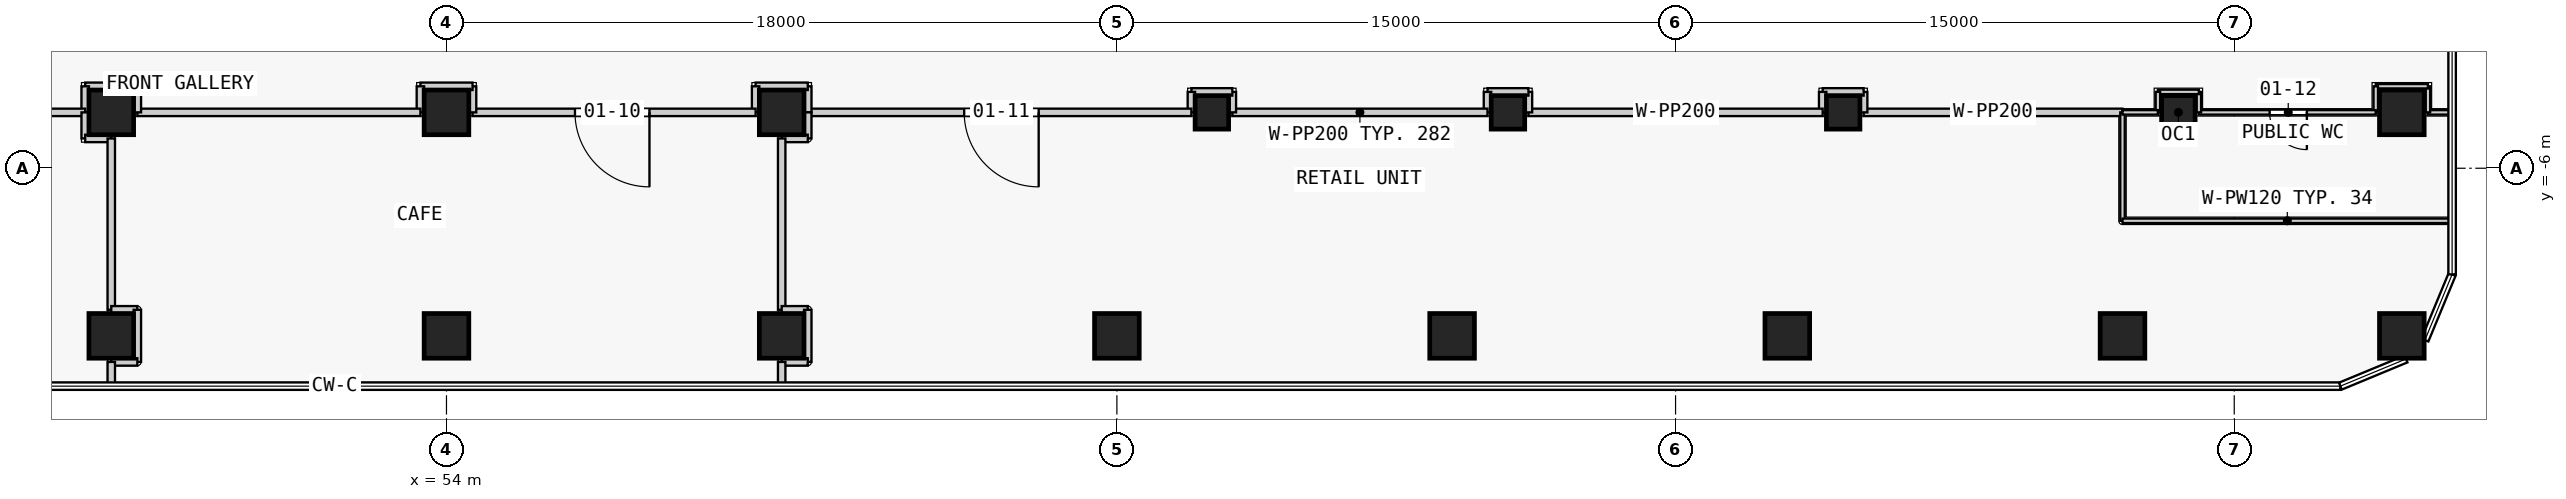
"""IFC4 building model, lengths in metres.
Left out: names, types, materials, properties, quantities, classifications, styles, units other than length and angle.
Written with IfcOpenShell. Run it as: python <this file> out.ifc"""

import sys

from ifc_helpers import new_model, si_unit, direction, frame, frame_2d, origin, origin_2d, place, context, subcontext, project, spatial, rectangle, extrude, element, fill, save


model = new_model("IFC4")
c1 = context("Model", 3, precision=1e-05, world=origin(), true_north=direction((0.0, 1.0)))
c2 = subcontext(c1, "Body", "Model", "MODEL_VIEW")
j1 = project(units=[si_unit("LENGTHUNIT", "METRE"), si_unit("PLANEANGLEUNIT", "RADIAN")], contexts=[c1])
p1 = place(None, origin())
s1 = spatial("IfcSite", under=j1, at=p1, CompositionType="ELEMENT")
p2 = place(p1, origin())
s2 = spatial("IfcBuilding", under=s1, at=p2, CompositionType="ELEMENT")
p3 = place(p2, frame((0.0, 0.0, 8.0)))
s3 = spatial("IfcBuildingStorey", under=s2, at=p3, CompositionType="ELEMENT", Elevation=8.0)
for number, where, z_axis, x_axis in (
    (1, (45.0, -10.5, 0.0), (0.0, 0.0, 1.0), (1.0, 0.0, 0.0)),
    (2, (45.0, -4.5, 0.0), (0.0, 0.0, 1.0), (1.0, 0.0, 0.0)),
    (3, (54.0, -10.5, 0.0), (0.0, 0.0, 1.0), (1.0, 0.0, 0.0)),
    (4, (54.0, -4.5, 0.0), (0.0, 0.0, 1.0), (1.0, 0.0, 0.0)),
    (5, (63.0, -10.5, 0.0), (0.0, 0.0, 1.0), (1.0, 0.0, 0.0)),
    (6, (63.0, -4.5, 0.0), (0.0, 0.0, 1.0), (1.0, 0.0, 0.0)),
    (7, (72.0, -10.5, 0.0), (0.0, 0.0, 1.0), (1.0, 0.0, 0.0)),
    (8, (81.0, -10.5, 0.0), (0.0, 0.0, 1.0), (1.0, 0.0, 0.0)),
    (9, (90.0, -10.5, 0.0), (0.0, 0.0, 1.0), (1.0, 0.0, 0.0)),
    (10, (99.0, -10.5, 0.0), (0.0, 0.0, 1.0), (1.0, 0.0, 0.0)),
    (11, (106.5, -10.5, 0.0), (0.0, 0.0, 1.0), (1.0, 0.0, 0.0)),
    (12, (106.5, -4.5, 0.0), (0.0, 0.0, 1.0), (1.0, 0.0, 0.0)),
):
    element("IfcColumn", number, at=place(p3, frame(where, z_axis=z_axis, x_axis=x_axis)), inside=s3, PredefinedType="COLUMN", context=c2, shape_type="SweptSolid", body=[
        extrude(rectangle(XDim=1.2, YDim=1.2, at=origin_2d()), origin(), (0.0, 0.0, 1.0), 4.8),
    ])
for number, where, z_axis, x_axis in (
    (13, (74.55, -4.5, 0.0), (0.0, 0.0, 1.0), (1.0, 0.0, 0.0)),
    (14, (82.5, -4.5, 0.0), (0.0, 0.0, 1.0), (1.0, 0.0, 0.0)),
    (15, (91.5, -4.5, 0.0), (0.0, 0.0, 1.0), (1.0, 0.0, 0.0)),
    (16, (100.5, -4.5, 0.0), (0.0, 0.0, 1.0), (1.0, 0.0, 0.0)),
):
    element("IfcColumn", number, at=place(p3, frame(where, z_axis=z_axis, x_axis=x_axis)), inside=s3, PredefinedType="COLUMN", context=c2, shape_type="SweptSolid", body=[
        extrude(rectangle(XDim=0.9, YDim=0.9, at=origin_2d()), origin(), (0.0, 0.0, 1.0), 4.8),
    ])
p4 = place(p3, frame((99.0, -4.5, 0.0), z_axis=(0.0, 0.0, 1.0), x_axis=(-1.0, 0.0, 0.0)))
e17 = element("IfcWall", 17, at=p4, inside=s3, PredefinedType="PARTITIONING", context=c2, shape_type="SweptSolid", body=[
    extrude(rectangle(XDim=6.95, YDim=0.2, at=frame_2d((3.475, 0.0))), origin(), (0.0, 0.0, 1.0), 4.45),
])
p5 = place(p3, frame((92.05, -4.5, 0.0), z_axis=(0.0, 0.0, 1.0), x_axis=(0.0, 1.0, 0.0)))
e18 = element("IfcWall", 18, at=p5, inside=s3, PredefinedType="PARTITIONING", context=c2, shape_type="SweptSolid", body=[
    extrude(rectangle(XDim=0.55, YDim=0.2, at=frame_2d((0.275, 0.0))), origin(), (0.0, 0.0, 1.0), 4.45),
])
p6 = place(p3, frame((92.05, -3.95, 0.0), z_axis=(0.0, 0.0, 1.0), x_axis=(-1.0, 0.0, 0.0)))
e19 = element("IfcWall", 19, at=p6, inside=s3, PredefinedType="PARTITIONING", context=c2, shape_type="SweptSolid", body=[
    extrude(rectangle(XDim=1.1, YDim=0.2, at=frame_2d((0.55, 0.0))), origin(), (0.0, 0.0, 1.0), 4.45),
])
p7 = place(p3, frame((90.95, -3.95, 0.0), z_axis=(0.0, 0.0, 1.0), x_axis=(0.0, -1.0, 0.0)))
e20 = element("IfcWall", 20, at=p7, inside=s3, PredefinedType="PARTITIONING", context=c2, shape_type="SweptSolid", body=[
    extrude(rectangle(XDim=0.55, YDim=0.2, at=frame_2d((0.275, 0.0))), origin(), (0.0, 0.0, 1.0), 4.45),
])
p8 = place(p3, frame((90.95, -4.5, 0.0), z_axis=(0.0, 0.0, 1.0), x_axis=(-1.0, 0.0, 0.0)))
e21 = element("IfcWall", 21, at=p8, inside=s3, PredefinedType="PARTITIONING", context=c2, shape_type="SweptSolid", body=[
    extrude(rectangle(XDim=7.9, YDim=0.2, at=frame_2d((3.95, 0.0))), origin(), (0.0, 0.0, 1.0), 4.45),
])
p9 = place(p3, frame((83.05, -4.5, 0.0), z_axis=(0.0, 0.0, 1.0), x_axis=(0.0, 1.0, 0.0)))
e22 = element("IfcWall", 22, at=p9, inside=s3, PredefinedType="PARTITIONING", context=c2, shape_type="SweptSolid", body=[
    extrude(rectangle(XDim=0.55, YDim=0.2, at=frame_2d((0.275, 0.0))), origin(), (0.0, 0.0, 1.0), 4.45),
])
p10 = place(p3, frame((83.05, -3.95, 0.0), z_axis=(0.0, 0.0, 1.0), x_axis=(-1.0, 0.0, 0.0)))
e23 = element("IfcWall", 23, at=p10, inside=s3, PredefinedType="PARTITIONING", context=c2, shape_type="SweptSolid", body=[
    extrude(rectangle(XDim=1.1, YDim=0.2, at=frame_2d((0.55, 0.0))), origin(), (0.0, 0.0, 1.0), 4.45),
])
p11 = place(p3, frame((81.95, -3.95, 0.0), z_axis=(0.0, 0.0, 1.0), x_axis=(0.0, -1.0, 0.0)))
e24 = element("IfcWall", 24, at=p11, inside=s3, PredefinedType="PARTITIONING", context=c2, shape_type="SweptSolid", body=[
    extrude(rectangle(XDim=0.55, YDim=0.2, at=frame_2d((0.275, 0.0))), origin(), (0.0, 0.0, 1.0), 4.45),
])
p12 = place(p3, frame((81.95, -4.5, 0.0), z_axis=(0.0, 0.0, 1.0), x_axis=(-1.0, 0.0, 0.0)))
e25 = element("IfcWall", 25, at=p12, inside=s3, PredefinedType="PARTITIONING", context=c2, shape_type="SweptSolid", body=[
    extrude(rectangle(XDim=6.85, YDim=0.2, at=frame_2d((3.425, 0.0))), origin(), (0.0, 0.0, 1.0), 4.45),
])
p13 = place(p3, frame((75.1, -4.5, 0.0), z_axis=(0.0, 0.0, 1.0), x_axis=(0.0, 1.0, 0.0)))
e26 = element("IfcWall", 26, at=p13, inside=s3, PredefinedType="PARTITIONING", context=c2, shape_type="SweptSolid", body=[
    extrude(rectangle(XDim=0.55, YDim=0.2, at=frame_2d((0.275, 0.0))), origin(), (0.0, 0.0, 1.0), 4.45),
])
p14 = place(p3, frame((75.1, -3.95, 0.0), z_axis=(0.0, 0.0, 1.0), x_axis=(-1.0, 0.0, 0.0)))
e27 = element("IfcWall", 27, at=p14, inside=s3, PredefinedType="PARTITIONING", context=c2, shape_type="SweptSolid", body=[
    extrude(rectangle(XDim=1.1, YDim=0.2, at=frame_2d((0.55, 0.0))), origin(), (0.0, 0.0, 1.0), 4.45),
])
p15 = place(p3, frame((74.0, -3.95, 0.0), z_axis=(0.0, 0.0, 1.0), x_axis=(0.0, -1.0, 0.0)))
e28 = element("IfcWall", 28, at=p15, inside=s3, PredefinedType="PARTITIONING", context=c2, shape_type="SweptSolid", body=[
    extrude(rectangle(XDim=0.55, YDim=0.2, at=frame_2d((0.275, 0.0))), origin(), (0.0, 0.0, 1.0), 4.45),
])
p16 = place(p3, frame((74.0, -4.5, 0.0), z_axis=(0.0, 0.0, 1.0), x_axis=(-1.0, 0.0, 0.0)))
e29 = element("IfcWall", 29, at=p16, inside=s3, PredefinedType="PARTITIONING", context=c2, shape_type="SweptSolid", body=[
    extrude(rectangle(XDim=10.3, YDim=0.2, at=frame_2d((5.15, 0.0))), origin(), (0.0, 0.0, 1.0), 4.45),
])
p17 = place(p16, frame((4.1, 0.0, 0.0)))
e30 = element("IfcOpeningElement", 30, at=p17, cuts=e29, PredefinedType="OPENING", context=c2, shape_type="SweptSolid", body=[
    extrude(rectangle(XDim=2.0, YDim=2.4, at=frame_2d((1.0, 1.2))), frame((0.0, 0.11, 0.0), z_axis=(0.0, -1.0, 0.0), x_axis=(1.0, 0.0, 0.0)), (0.0, 0.0, 1.0), 0.22),
])
p18 = place(p3, frame((63.7, -4.5, 0.0), z_axis=(0.0, 0.0, 1.0), x_axis=(0.0, 1.0, 0.0)))
e31 = element("IfcWall", 31, at=p18, inside=s3, PredefinedType="PARTITIONING", context=c2, shape_type="SweptSolid", body=[
    extrude(rectangle(XDim=0.7, YDim=0.2, at=frame_2d((0.35, 0.0))), origin(), (0.0, 0.0, 1.0), 4.45),
])
p19 = place(p3, frame((63.7, -3.8, 0.0), z_axis=(0.0, 0.0, 1.0), x_axis=(-1.0, 0.0, 0.0)))
e32 = element("IfcWall", 32, at=p19, inside=s3, PredefinedType="PARTITIONING", context=c2, shape_type="SweptSolid", body=[
    extrude(rectangle(XDim=1.4, YDim=0.2, at=frame_2d((0.7, 0.0))), origin(), (0.0, 0.0, 1.0), 3.75),
])
p20 = place(p3, frame((62.3, -3.8, 0.0), z_axis=(0.0, 0.0, 1.0), x_axis=(0.0, -1.0, 0.0)))
e33 = element("IfcWall", 33, at=p20, inside=s3, PredefinedType="PARTITIONING", context=c2, shape_type="SweptSolid", body=[
    extrude(rectangle(XDim=0.7, YDim=0.2, at=frame_2d((0.35, 0.0))), origin(), (0.0, 0.0, 1.0), 3.75),
])
p21 = place(p3, frame((62.3, -4.5, 0.0), z_axis=(0.0, 0.0, 1.0), x_axis=(-1.0, 0.0, 0.0)))
e34 = element("IfcWall", 34, at=p21, inside=s3, PredefinedType="PARTITIONING", context=c2, shape_type="SweptSolid", body=[
    extrude(rectangle(XDim=7.6, YDim=0.2, at=frame_2d((3.8, 0.0))), origin(), (0.0, 0.0, 1.0), 3.75),
])
p22 = place(p21, frame((2.85, 0.0, 0.0)))
e35 = element("IfcOpeningElement", 35, at=p22, cuts=e34, PredefinedType="OPENING", context=c2, shape_type="SweptSolid", body=[
    extrude(rectangle(XDim=2.0, YDim=2.4, at=frame_2d((1.0, 1.2))), frame((0.0, 0.11, 0.0), z_axis=(0.0, -1.0, 0.0), x_axis=(1.0, 0.0, 0.0)), (0.0, 0.0, 1.0), 0.22),
])
p23 = place(p3, frame((54.7, -4.5, 0.0), z_axis=(0.0, 0.0, 1.0), x_axis=(0.0, 1.0, 0.0)))
e36 = element("IfcWall", 36, at=p23, inside=s3, PredefinedType="PARTITIONING", context=c2, shape_type="SweptSolid", body=[
    extrude(rectangle(XDim=0.7, YDim=0.2, at=frame_2d((0.35, 0.0))), origin(), (0.0, 0.0, 1.0), 3.75),
])
p24 = place(p3, frame((54.7, -3.8, 0.0), z_axis=(0.0, 0.0, 1.0), x_axis=(-1.0, 0.0, 0.0)))
e37 = element("IfcWall", 37, at=p24, inside=s3, PredefinedType="PARTITIONING", context=c2, shape_type="SweptSolid", body=[
    extrude(rectangle(XDim=1.4, YDim=0.2, at=frame_2d((0.7, 0.0))), origin(), (0.0, 0.0, 1.0), 3.75),
])
p25 = place(p3, frame((53.3, -3.8, 0.0), z_axis=(0.0, 0.0, 1.0), x_axis=(0.0, -1.0, 0.0)))
e38 = element("IfcWall", 38, at=p25, inside=s3, PredefinedType="PARTITIONING", context=c2, shape_type="SweptSolid", body=[
    extrude(rectangle(XDim=0.7, YDim=0.2, at=frame_2d((0.35, 0.0))), origin(), (0.0, 0.0, 1.0), 3.75),
])
p26 = place(p3, frame((53.3, -4.5, 0.0), z_axis=(0.0, 0.0, 1.0), x_axis=(-1.0, 0.0, 0.0)))
e39 = element("IfcWall", 39, at=p26, inside=s3, PredefinedType="PARTITIONING", context=c2, shape_type="SweptSolid", body=[
    extrude(rectangle(XDim=7.6, YDim=0.2, at=frame_2d((3.8, 0.0))), origin(), (0.0, 0.0, 1.0), 3.75),
])
p27 = place(p3, frame((45.7, -4.5, 0.0), z_axis=(0.0, 0.0, 1.0), x_axis=(0.0, 1.0, 0.0)))
e40 = element("IfcWall", 40, at=p27, inside=s3, PredefinedType="PARTITIONING", context=c2, shape_type="SweptSolid", body=[
    extrude(rectangle(XDim=0.7, YDim=0.2, at=frame_2d((0.35, 0.0))), origin(), (0.0, 0.0, 1.0), 3.75),
])
p28 = place(p3, frame((45.7, -3.8, 0.0), z_axis=(0.0, 0.0, 1.0), x_axis=(-1.0, 0.0, 0.0)))
e41 = element("IfcWall", 41, at=p28, inside=s3, PredefinedType="PARTITIONING", context=c2, shape_type="SweptSolid", body=[
    extrude(rectangle(XDim=1.4, YDim=0.2, at=frame_2d((0.7, 0.0))), origin(), (0.0, 0.0, 1.0), 3.75),
])
p29 = place(p3, frame((44.3, -3.8, 0.0), z_axis=(0.0, 0.0, 1.0), x_axis=(0.0, -1.0, 0.0)))
e42 = element("IfcWall", 42, at=p29, inside=s3, PredefinedType="PARTITIONING", context=c2, shape_type="SweptSolid", body=[
    extrude(rectangle(XDim=0.7, YDim=0.2, at=frame_2d((0.35, 0.0))), origin(), (0.0, 0.0, 1.0), 3.75),
])
p30 = place(p3, frame((44.3, -4.5, 0.0), z_axis=(0.0, 0.0, 1.0), x_axis=(-1.0, 0.0, 0.0)))
e43 = element("IfcWall", 43, at=p30, inside=s3, PredefinedType="PARTITIONING", context=c2, shape_type="SweptSolid", body=[
    extrude(rectangle(XDim=7.6, YDim=0.2, at=frame_2d((3.8, 0.0))), origin(), (0.0, 0.0, 1.0), 3.75),
])
p31 = place(p3, frame((99.0, -4.5, 0.0), z_axis=(0.0, 0.0, 1.0), x_axis=(0.0, -1.0, 0.0)))
e44 = element("IfcWall", 44, at=p31, inside=s3, PredefinedType="PARTITIONING", context=c2, shape_type="SweptSolid", body=[
    extrude(rectangle(XDim=2.911, YDim=0.12, at=frame_2d((1.456, 0.0))), origin(), (0.0, 0.0, 1.0), 4.45),
])
p32 = place(p3, frame((99.0, -7.411, 0.0), z_axis=(0.0, 0.0, 1.0), x_axis=(1.0, 0.0, 0.0)))
e45 = element("IfcWall", 45, at=p32, inside=s3, PredefinedType="PARTITIONING", context=c2, shape_type="SweptSolid", body=[
    extrude(rectangle(XDim=8.85, YDim=0.12, at=frame_2d((4.425, 0.0))), origin(), (0.0, 0.0, 1.0), 3.75),
])
p33 = place(p3, frame((107.85, -4.5, 0.0), z_axis=(0.0, 0.0, 1.0), x_axis=(-1.0, 0.0, 0.0)))
e46 = element("IfcWall", 46, at=p33, inside=s3, PredefinedType="PARTITIONING", context=c2, shape_type="SweptSolid", body=[
    extrude(rectangle(XDim=0.65, YDim=0.12, at=frame_2d((0.325, 0.0))), origin(), (0.0, 0.0, 1.0), 4.45),
])
p34 = place(p3, frame((107.2, -4.5, 0.0), z_axis=(0.0, 0.0, 1.0), x_axis=(0.0, 1.0, 0.0)))
e47 = element("IfcWall", 47, at=p34, inside=s3, PredefinedType="PARTITIONING", context=c2, shape_type="SweptSolid", body=[
    extrude(rectangle(XDim=0.7, YDim=0.12, at=frame_2d((0.35, 0.0))), origin(), (0.0, 0.0, 1.0), 4.45),
])
p35 = place(p3, frame((107.2, -3.8, 0.0), z_axis=(0.0, 0.0, 1.0), x_axis=(-1.0, 0.0, 0.0)))
e48 = element("IfcWall", 48, at=p35, inside=s3, PredefinedType="PARTITIONING", context=c2, shape_type="SweptSolid", body=[
    extrude(rectangle(XDim=1.4, YDim=0.12, at=frame_2d((0.7, 0.0))), origin(), (0.0, 0.0, 1.0), 3.75),
])
p36 = place(p3, frame((105.8, -3.8, 0.0), z_axis=(0.0, 0.0, 1.0), x_axis=(0.0, -1.0, 0.0)))
e49 = element("IfcWall", 49, at=p36, inside=s3, PredefinedType="PARTITIONING", context=c2, shape_type="SweptSolid", body=[
    extrude(rectangle(XDim=0.7, YDim=0.12, at=frame_2d((0.35, 0.0))), origin(), (0.0, 0.0, 1.0), 4.45),
])
p37 = place(p3, frame((105.8, -4.5, 0.0), z_axis=(0.0, 0.0, 1.0), x_axis=(-1.0, 0.0, 0.0)))
e50 = element("IfcWall", 50, at=p37, inside=s3, PredefinedType="PARTITIONING", context=c2, shape_type="SweptSolid", body=[
    extrude(rectangle(XDim=4.75, YDim=0.12, at=frame_2d((2.375, 0.0))), origin(), (0.0, 0.0, 1.0), 4.45),
])
p38 = place(p37, frame((1.85, 0.0, 0.0)))
e51 = element("IfcOpeningElement", 51, at=p38, cuts=e50, PredefinedType="OPENING", context=c2, shape_type="SweptSolid", body=[
    extrude(rectangle(XDim=1.0, YDim=2.1, at=frame_2d((0.5, 1.05))), frame((0.0, 0.07, 0.0), z_axis=(0.0, -1.0, 0.0), x_axis=(1.0, 0.0, 0.0)), (0.0, 0.0, 1.0), 0.14),
])
p39 = place(p3, frame((101.05, -4.5, 0.0), z_axis=(0.0, 0.0, 1.0), x_axis=(0.0, 1.0, 0.0)))
e52 = element("IfcWall", 52, at=p39, inside=s3, PredefinedType="PARTITIONING", context=c2, shape_type="SweptSolid", body=[
    extrude(rectangle(XDim=0.55, YDim=0.12, at=frame_2d((0.275, 0.0))), origin(), (0.0, 0.0, 1.0), 4.45),
])
p40 = place(p3, frame((101.05, -3.95, 0.0), z_axis=(0.0, 0.0, 1.0), x_axis=(-1.0, 0.0, 0.0)))
e53 = element("IfcWall", 53, at=p40, inside=s3, PredefinedType="PARTITIONING", context=c2, shape_type="SweptSolid", body=[
    extrude(rectangle(XDim=1.1, YDim=0.12, at=frame_2d((0.55, 0.0))), origin(), (0.0, 0.0, 1.0), 4.45),
])
p41 = place(p3, frame((99.95, -3.95, 0.0), z_axis=(0.0, 0.0, 1.0), x_axis=(0.0, -1.0, 0.0)))
e54 = element("IfcWall", 54, at=p41, inside=s3, PredefinedType="PARTITIONING", context=c2, shape_type="SweptSolid", body=[
    extrude(rectangle(XDim=0.55, YDim=0.12, at=frame_2d((0.275, 0.0))), origin(), (0.0, 0.0, 1.0), 4.45),
])
p42 = place(p3, frame((99.95, -4.5, 0.0), z_axis=(0.0, 0.0, 1.0), x_axis=(-1.0, 0.0, 0.0)))
e55 = element("IfcWall", 55, at=p42, inside=s3, PredefinedType="PARTITIONING", context=c2, shape_type="SweptSolid", body=[
    extrude(rectangle(XDim=0.95, YDim=0.12, at=frame_2d((0.475, 0.0))), origin(), (0.0, 0.0, 1.0), 4.45),
])
for number, where, z_axis, x_axis in (
    (56, (44.3, -4.5, 0.0), (0.0, 0.0, 1.0), (0.0, -1.0, 0.0)),
    (57, (44.3, -5.2, 0.0), (0.0, 0.0, 1.0), (1.0, 0.0, 0.0)),
):
    element("IfcWall", number, at=place(p3, frame(where, z_axis=z_axis, x_axis=x_axis)), inside=s3, PredefinedType="PARTITIONING", context=c2, shape_type="SweptSolid", body=[
        extrude(rectangle(XDim=0.7, YDim=0.2, at=frame_2d((0.35, 0.0))), origin(), (0.0, 0.0, 1.0), 3.75),
    ])
p43 = place(p3, frame((45.0, -5.2, 0.0), z_axis=(0.0, 0.0, 1.0), x_axis=(0.0, -1.0, 0.0)))
e58 = element("IfcWall", 58, at=p43, inside=s3, PredefinedType="PARTITIONING", context=c2, shape_type="SweptSolid", body=[
    extrude(rectangle(XDim=4.6, YDim=0.2, at=frame_2d((2.3, 0.0))), origin(), (0.0, 0.0, 1.0), 3.75),
])
p44 = place(p3, frame((45.0, -9.8, 0.0), z_axis=(0.0, 0.0, 1.0), x_axis=(1.0, 0.0, 0.0)))
e59 = element("IfcWall", 59, at=p44, inside=s3, PredefinedType="PARTITIONING", context=c2, shape_type="SweptSolid", body=[
    extrude(rectangle(XDim=0.7, YDim=0.2, at=frame_2d((0.35, 0.0))), origin(), (0.0, 0.0, 1.0), 3.75),
])
p45 = place(p3, frame((45.7, -9.8, 0.0), z_axis=(0.0, 0.0, 1.0), x_axis=(0.0, -1.0, 0.0)))
e60 = element("IfcWall", 60, at=p45, inside=s3, PredefinedType="PARTITIONING", context=c2, shape_type="SweptSolid", body=[
    extrude(rectangle(XDim=1.4, YDim=0.2, at=frame_2d((0.7, 0.0))), origin(), (0.0, 0.0, 1.0), 3.75),
])
p46 = place(p3, frame((45.7, -11.2, 0.0), z_axis=(0.0, 0.0, 1.0), x_axis=(-1.0, 0.0, 0.0)))
e61 = element("IfcWall", 61, at=p46, inside=s3, PredefinedType="PARTITIONING", context=c2, shape_type="SweptSolid", body=[
    extrude(rectangle(XDim=0.7, YDim=0.2, at=frame_2d((0.35, 0.0))), origin(), (0.0, 0.0, 1.0), 4.45),
])
p47 = place(p3, frame((45.0, -11.2, 0.0), z_axis=(0.0, 0.0, 1.0), x_axis=(0.0, -1.0, 0.0)))
e62 = element("IfcWall", 62, at=p47, inside=s3, PredefinedType="PARTITIONING", context=c2, shape_type="SweptSolid", body=[
    extrude(rectangle(XDim=0.65, YDim=0.2, at=frame_2d((0.325, 0.0))), origin(), (0.0, 0.0, 1.0), 4.45),
])
p48 = place(p3, frame((63.7, -4.5, 0.0), z_axis=(0.0, 0.0, 1.0), x_axis=(0.0, -1.0, 0.0)))
e63 = element("IfcWall", 63, at=p48, inside=s3, PredefinedType="PARTITIONING", context=c2, shape_type="SweptSolid", body=[
    extrude(rectangle(XDim=0.7, YDim=0.2, at=frame_2d((0.35, 0.0))), origin(), (0.0, 0.0, 1.0), 4.45),
])
p49 = place(p3, frame((63.7, -5.2, 0.0), z_axis=(0.0, 0.0, 1.0), x_axis=(-1.0, 0.0, 0.0)))
e64 = element("IfcWall", 64, at=p49, inside=s3, PredefinedType="PARTITIONING", context=c2, shape_type="SweptSolid", body=[
    extrude(rectangle(XDim=0.7, YDim=0.2, at=frame_2d((0.35, 0.0))), origin(), (0.0, 0.0, 1.0), 3.75),
])
p50 = place(p3, frame((63.0, -5.2, 0.0), z_axis=(0.0, 0.0, 1.0), x_axis=(0.0, -1.0, 0.0)))
e65 = element("IfcWall", 65, at=p50, inside=s3, PredefinedType="PARTITIONING", context=c2, shape_type="SweptSolid", body=[
    extrude(rectangle(XDim=4.6, YDim=0.2, at=frame_2d((2.3, 0.0))), origin(), (0.0, 0.0, 1.0), 3.75),
])
p51 = place(p3, frame((63.0, -9.8, 0.0), z_axis=(0.0, 0.0, 1.0), x_axis=(1.0, 0.0, 0.0)))
e66 = element("IfcWall", 66, at=p51, inside=s3, PredefinedType="PARTITIONING", context=c2, shape_type="SweptSolid", body=[
    extrude(rectangle(XDim=0.7, YDim=0.2, at=frame_2d((0.35, 0.0))), origin(), (0.0, 0.0, 1.0), 3.75),
])
p52 = place(p3, frame((63.7, -9.8, 0.0), z_axis=(0.0, 0.0, 1.0), x_axis=(0.0, -1.0, 0.0)))
e67 = element("IfcWall", 67, at=p52, inside=s3, PredefinedType="PARTITIONING", context=c2, shape_type="SweptSolid", body=[
    extrude(rectangle(XDim=1.4, YDim=0.2, at=frame_2d((0.7, 0.0))), origin(), (0.0, 0.0, 1.0), 3.75),
])
p53 = place(p3, frame((63.7, -11.2, 0.0), z_axis=(0.0, 0.0, 1.0), x_axis=(-1.0, 0.0, 0.0)))
e68 = element("IfcWall", 68, at=p53, inside=s3, PredefinedType="PARTITIONING", context=c2, shape_type="SweptSolid", body=[
    extrude(rectangle(XDim=0.7, YDim=0.2, at=frame_2d((0.35, 0.0))), origin(), (0.0, 0.0, 1.0), 4.45),
])
p54 = place(p3, frame((63.0, -11.2, 0.0), z_axis=(0.0, 0.0, 1.0), x_axis=(0.0, -1.0, 0.0)))
e69 = element("IfcWall", 69, at=p54, inside=s3, PredefinedType="PARTITIONING", context=c2, shape_type="SweptSolid", body=[
    extrude(rectangle(XDim=0.65, YDim=0.2, at=frame_2d((0.325, 0.0))), origin(), (0.0, 0.0, 1.0), 4.45),
])
p55 = place(p22, origin())
e70 = element("IfcDoor", 70, at=p55, inside=s3, OperationType="SINGLE_SWING_LEFT", PredefinedType="DOOR", context=c2, shape_type="SweptSolid", body=[
    extrude(rectangle(XDim=2.0, YDim=2.4, at=frame_2d((1.0, 1.2))), frame((0.0, 0.025, 0.0), z_axis=(0.0, -1.0, 0.0), x_axis=(1.0, 0.0, 0.0)), (0.0, 0.0, 1.0), 0.05),
])
fill(e35, e70)
p56 = place(p17, origin())
e71 = element("IfcDoor", 71, at=p56, inside=s3, OperationType="SINGLE_SWING_LEFT", PredefinedType="DOOR", context=c2, shape_type="SweptSolid", body=[
    extrude(rectangle(XDim=2.0, YDim=2.4, at=frame_2d((1.0, 1.2))), frame((0.0, 0.025, 0.0), z_axis=(0.0, -1.0, 0.0), x_axis=(1.0, 0.0, 0.0)), (0.0, 0.0, 1.0), 0.05),
])
fill(e30, e71)
p57 = place(p38, origin())
e72 = element("IfcDoor", 72, at=p57, inside=s3, OperationType="SINGLE_SWING_LEFT", PredefinedType="DOOR", context=c2, shape_type="SweptSolid", body=[
    extrude(rectangle(XDim=1.0, YDim=2.1, at=frame_2d((0.5, 1.05))), frame((0.0, 0.025, 0.0), z_axis=(0.0, -1.0, 0.0), x_axis=(1.0, 0.0, 0.0)), (0.0, 0.0, 1.0), 0.05),
])
fill(e51, e72)
save(model, sys.argv[1])
